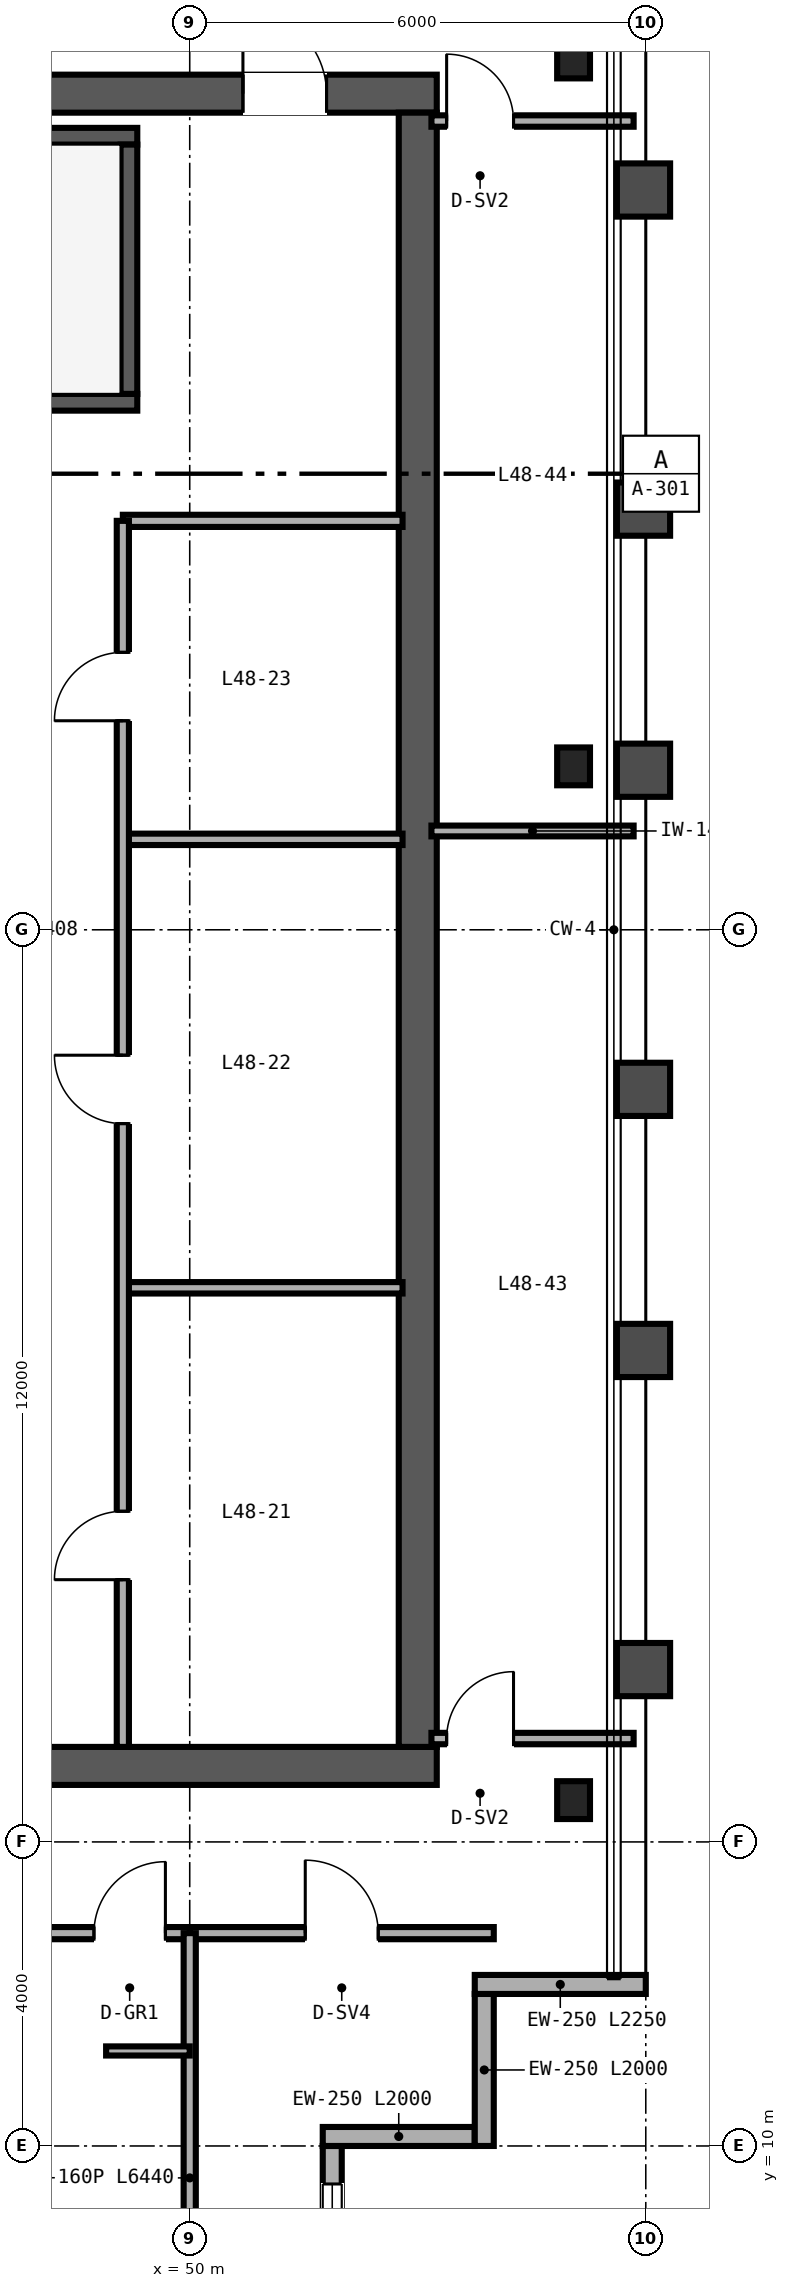
"""IFC4 building model, lengths in metres.
Left out: names, types, materials, properties, quantities, classifications, styles, units other than length and angle.
Written with IfcOpenShell. Run it as: python <this file> out.ifc"""

import sys

from ifc_helpers import new_model, si_unit, direction, frame, frame_2d, origin, origin_2d, place, context, subcontext, project, spatial, rectangle, i_section, extrude, source, transform, mapped, element, fill, save


model = new_model("IFC4")
c1 = context("Model", 3, precision=1e-05, world=origin(), true_north=direction((0.0, 1.0)))
c2 = subcontext(c1, "Body", "Model", "MODEL_VIEW")
j1 = project(units=[si_unit("LENGTHUNIT", "METRE"), si_unit("PLANEANGLEUNIT", "RADIAN")], contexts=[c1])
p1 = place(None, origin())
s1 = spatial("IfcSite", under=j1, at=p1, CompositionType="ELEMENT")
p2 = place(p1, origin())
s2 = spatial("IfcBuilding", under=s1, at=p2, CompositionType="ELEMENT")
p3 = place(p2, frame((0.0, 0.0, 192.0)))
s3 = spatial("IfcBuildingStorey", under=s2, at=p3, CompositionType="ELEMENT", Elevation=192.0)
p4 = place(p3, frame((40.75, 15.0, 0.0), z_axis=(0.0, 0.0, 1.0), x_axis=(1.0, 0.0, 0.0)))
e1 = element("IfcWall", 1, at=p4, inside=s3, PredefinedType="SHEAR", context=c2, shape_type="SweptSolid", body=[
    extrude(rectangle(XDim=12.5, YDim=0.5, at=frame_2d((6.25, 0.0))), origin(), (0.0, 0.0, 1.0), 3.37),
])
p5 = place(p4, frame((4.35, 0.0, 0.0)))
e2 = element("IfcOpeningElement", 2, at=p5, cuts=e1, PredefinedType="OPENING", context=c2, shape_type="SweptSolid", body=[
    extrude(rectangle(XDim=1.0, YDim=2.15, at=frame_2d((0.5, 1.075))), frame((0.0, 0.26, 0.0), z_axis=(0.0, -1.0, 0.0), x_axis=(1.0, 0.0, 0.0)), (0.0, 0.0, 1.0), 0.52),
])
p6 = place(p3, frame((40.75, 37.0, 0.0), z_axis=(0.0, 0.0, 1.0), x_axis=(1.0, 0.0, 0.0)))
e3 = element("IfcWall", 3, at=p6, inside=s3, PredefinedType="SHEAR", context=c2, shape_type="SweptSolid", body=[
    extrude(rectangle(XDim=12.5, YDim=0.5, at=frame_2d((6.25, 0.0))), origin(), (0.0, 0.0, 1.0), 3.37),
])
p7 = place(p6, frame((9.95, 0.0, 0.0)))
e4 = element("IfcOpeningElement", 4, at=p7, cuts=e3, PredefinedType="OPENING", context=c2, shape_type="SweptSolid", body=[
    extrude(rectangle(XDim=1.1, YDim=2.15, at=frame_2d((0.55, 1.075))), frame((0.0, 0.26, 0.0), z_axis=(0.0, -1.0, 0.0), x_axis=(1.0, 0.0, 0.0)), (0.0, 0.0, 1.0), 0.52),
])
p8 = place(p3, frame((53.0, 15.25, 0.0), z_axis=(0.0, 0.0, 1.0), x_axis=(0.0, 1.0, 0.0)))
e5 = element("IfcWall", 5, at=p8, inside=s3, PredefinedType="SHEAR", context=c2, shape_type="SweptSolid", body=[
    extrude(rectangle(XDim=21.5, YDim=0.5, at=frame_2d((10.75, 0.0))), origin(), (0.0, 0.0, 1.0), 3.37),
])
p9 = place(p3, frame((41.25, 32.94, 0.0), z_axis=(0.0, 0.0, 1.0), x_axis=(1.0, 0.0, 0.0)))
e6 = element("IfcWall", 6, at=p9, inside=s3, PredefinedType="SHEAR", context=c2, shape_type="SweptSolid", body=[
    extrude(rectangle(XDim=8.06, YDim=0.22, at=frame_2d((4.03, 0.0))), origin(), (0.0, 0.0, 1.0), 3.4),
])
p10 = place(p9, frame((0.67, 0.0, 0.0)))
e7 = element("IfcOpeningElement", 7, at=p10, cuts=e6, PredefinedType="OPENING", context=c2, shape_type="SweptSolid", body=[
    extrude(rectangle(XDim=1.05, YDim=2.15, at=frame_2d((0.525, 1.075))), frame((0.0, 0.12, 0.0), z_axis=(0.0, -1.0, 0.0), x_axis=(1.0, 0.0, 0.0)), (0.0, 0.0, 1.0), 0.24),
])
p11 = place(p3, frame((41.25, 36.44, 0.0), z_axis=(0.0, 0.0, 1.0), x_axis=(1.0, 0.0, 0.0)))
e8 = element("IfcWall", 8, at=p11, inside=s3, PredefinedType="SHEAR", context=c2, shape_type="SweptSolid", body=[
    extrude(rectangle(XDim=8.06, YDim=0.22, at=frame_2d((4.03, 0.0))), origin(), (0.0, 0.0, 1.0), 3.4),
])
p12 = place(p3, frame((49.2, 33.05, 0.0), z_axis=(0.0, 0.0, 1.0), x_axis=(0.0, 1.0, 0.0)))
e9 = element("IfcWall", 9, at=p12, inside=s3, PredefinedType="SHEAR", context=c2, shape_type="SweptSolid", body=[
    extrude(rectangle(XDim=3.28, YDim=0.22, at=frame_2d((1.64, 0.0))), origin(), (0.0, 0.0, 1.0), 3.4),
])
m1 = source(origin(), c2, "Body", "SweptSolid", [
    extrude(i_section(OverallWidth=0.432, OverallDepth=0.498, WebThickness=0.056, FlangeThickness=0.089, FilletRadius=0.025, at=origin_2d()), origin(), (0.0, 0.0, 1.0), 3.37),
])
for number, where, z_axis, x_axis in (
    (10, (55.05, 14.55, 0.0), (0.0, 0.0, 1.0), (1.0, 0.0, 0.0)),
    (11, (55.05, 28.15, 0.0), (0.0, 0.0, 1.0), (1.0, 0.0, 0.0)),
    (12, (55.05, 37.45, 0.0), (0.0, 0.0, 1.0), (1.0, 0.0, 0.0)),
):
    element("IfcColumn", number, at=place(p3, frame(where, z_axis=z_axis, x_axis=x_axis)), inside=s3, PredefinedType="COLUMN", context=c2, shape_type="MappedRepresentation", body=[
        mapped(m1, transform((0.0, 0.0, 0.0), scale=1.0)),
    ])
p13 = place(p3, frame((51.875, 8.0, 0.0), z_axis=(0.0, 0.0, 1.0), x_axis=(0.0, 1.0, 0.0)))
e13 = element("IfcWall", 13, at=p13, inside=s3, PredefinedType="SOLIDWALL", context=c2, shape_type="SweptSolid", body=[
    extrude(rectangle(XDim=2.0, YDim=0.25, at=frame_2d((1.0, 0.0))), origin(), (0.0, 0.0, 1.0), 3.37),
])
p14 = place(p13, frame((0.5, 0.0, 0.85)))
e14 = element("IfcOpeningElement", 14, at=p14, cuts=e13, PredefinedType="OPENING", context=c2, shape_type="SweptSolid", body=[
    extrude(rectangle(XDim=1.0, YDim=1.9, at=frame_2d((0.5, 0.95))), frame((0.0, 0.135, 0.0), z_axis=(0.0, -1.0, 0.0), x_axis=(1.0, 0.0, 0.0)), (0.0, 0.0, 1.0), 0.27),
])
for number, where, z_axis, x_axis in (
    (15, (51.75, 10.125, 0.0), (0.0, 0.0, 1.0), (1.0, 0.0, 0.0)),
    (16, (53.875, 10.0, 0.0), (0.0, 0.0, 1.0), (0.0, 1.0, 0.0)),
):
    element("IfcWall", number, at=place(p3, frame(where, z_axis=z_axis, x_axis=x_axis)), inside=s3, PredefinedType="SOLIDWALL", context=c2, shape_type="SweptSolid", body=[
        extrude(rectangle(XDim=2.0, YDim=0.25, at=frame_2d((1.0, 0.0))), origin(), (0.0, 0.0, 1.0), 3.37),
    ])
p15 = place(p3, frame((53.75, 12.125, 0.0), z_axis=(0.0, 0.0, 1.0), x_axis=(1.0, 0.0, 0.0)))
e17 = element("IfcWall", 17, at=p15, inside=s3, PredefinedType="SOLIDWALL", context=c2, shape_type="SweptSolid", body=[
    extrude(rectangle(XDim=2.25, YDim=0.25, at=frame_2d((1.125, 0.0))), origin(), (0.0, 0.0, 1.0), 3.37),
])
p16 = place(p3, frame((49.12, 31.38, 0.0), z_axis=(0.0, 0.0, 1.0), x_axis=(1.0, 0.0, 0.0)))
e18 = element("IfcWall", 18, at=p16, inside=s3, PredefinedType="PARTITIONING", context=c2, shape_type="SweptSolid", body=[
    extrude(rectangle(XDim=3.68, YDim=0.16, at=frame_2d((1.84, 0.0))), origin(), (0.0, 0.0, 1.0), 2.47),
])
for number, where, z_axis, x_axis in (
    (19, (49.12, 21.29, 0.0), (0.0, 0.0, 1.0), (1.0, 0.0, 0.0)),
    (20, (49.12, 27.19, 0.0), (0.0, 0.0, 1.0), (1.0, 0.0, 0.0)),
):
    element("IfcWall", number, at=place(p3, frame(where, z_axis=z_axis, x_axis=x_axis)), inside=s3, PredefinedType="PARTITIONING", context=c2, shape_type="SweptSolid", body=[
        extrude(rectangle(XDim=3.68, YDim=0.15, at=frame_2d((1.84, 0.0))), origin(), (0.0, 0.0, 1.0), 3.37),
    ])
p17 = place(p3, frame((49.12, 15.25, 0.0), z_axis=(0.0, 0.0, 1.0), x_axis=(0.0, 1.0, 0.0)))
e21 = element("IfcWall", 21, at=p17, inside=s3, PredefinedType="PARTITIONING", context=c2, shape_type="SweptSolid", body=[
    extrude(rectangle(XDim=16.13, YDim=0.16, at=frame_2d((8.065, 0.0))), origin(), (0.0, 0.0, 1.0), 2.443),
])
p18 = place(p17, frame((2.2, 0.0, 0.0)))
e22 = element("IfcOpeningElement", 22, at=p18, cuts=e21, PredefinedType="OPENING", context=c2, shape_type="SweptSolid", body=[
    extrude(rectangle(XDim=0.9, YDim=2.15, at=frame_2d((0.45, 1.075))), frame((0.0, 0.09, 0.0), z_axis=(0.0, -1.0, 0.0), x_axis=(1.0, 0.0, 0.0)), (0.0, 0.0, 1.0), 0.18),
])
p19 = place(p17, frame((8.2, 0.0, 0.0)))
e23 = element("IfcOpeningElement", 23, at=p19, cuts=e21, PredefinedType="OPENING", context=c2, shape_type="SweptSolid", body=[
    extrude(rectangle(XDim=0.9, YDim=2.15, at=frame_2d((0.45, 1.075))), frame((0.0, 0.09, 0.0), z_axis=(0.0, -1.0, 0.0), x_axis=(1.0, 0.0, 0.0)), (0.0, 0.0, 1.0), 0.18),
])
p20 = place(p17, frame((13.5, 0.0, 0.0)))
e24 = element("IfcOpeningElement", 24, at=p20, cuts=e21, PredefinedType="OPENING", context=c2, shape_type="SweptSolid", body=[
    extrude(rectangle(XDim=0.9, YDim=2.15, at=frame_2d((0.45, 1.075))), frame((0.0, 0.09, 0.0), z_axis=(0.0, -1.0, 0.0), x_axis=(1.0, 0.0, 0.0)), (0.0, 0.0, 1.0), 0.18),
])
p21 = place(p3, frame((53.18, 15.36, 0.0), z_axis=(0.0, 0.0, 1.0), x_axis=(1.0, 0.0, 0.0)))
e25 = element("IfcWall", 25, at=p21, inside=s3, PredefinedType="PARTITIONING", context=c2, shape_type="SweptSolid", body=[
    extrude(rectangle(XDim=2.66, YDim=0.15, at=frame_2d((1.33, 0.0))), origin(), (0.0, 0.0, 1.0), 2.591),
])
p22 = place(p21, frame((0.2, 0.0, 0.0)))
e26 = element("IfcOpeningElement", 26, at=p22, cuts=e25, PredefinedType="OPENING", context=c2, shape_type="SweptSolid", body=[
    extrude(rectangle(XDim=0.88, YDim=2.15, at=frame_2d((0.44, 1.075))), frame((0.0, 0.085, 0.0), z_axis=(0.0, -1.0, 0.0), x_axis=(1.0, 0.0, 0.0)), (0.0, 0.0, 1.0), 0.17),
])
p23 = place(p3, frame((53.18, 36.64, 0.0), z_axis=(0.0, 0.0, 1.0), x_axis=(1.0, 0.0, 0.0)))
e27 = element("IfcWall", 27, at=p23, inside=s3, PredefinedType="PARTITIONING", context=c2, shape_type="SweptSolid", body=[
    extrude(rectangle(XDim=2.66, YDim=0.15, at=frame_2d((1.33, 0.0))), origin(), (0.0, 0.0, 1.0), 2.753),
])
p24 = place(p23, frame((0.2, 0.0, 0.0)))
e28 = element("IfcOpeningElement", 28, at=p24, cuts=e27, PredefinedType="OPENING", context=c2, shape_type="SweptSolid", body=[
    extrude(rectangle(XDim=0.88, YDim=2.15, at=frame_2d((0.44, 1.075))), frame((0.0, 0.085, 0.0), z_axis=(0.0, -1.0, 0.0), x_axis=(1.0, 0.0, 0.0)), (0.0, 0.0, 1.0), 0.17),
])
p25 = place(p3, frame((53.18, 27.3, 0.0), z_axis=(0.0, 0.0, 1.0), x_axis=(1.0, 0.0, 0.0)))
e29 = element("IfcWall", 29, at=p25, inside=s3, PredefinedType="PARTITIONING", context=c2, shape_type="SweptSolid", body=[
    extrude(rectangle(XDim=2.66, YDim=0.142, at=frame_2d((1.33, 0.0))), origin(), (0.0, 0.0, 1.0), 2.591),
])
p26 = place(p3, frame((50.0, 12.8, 0.0), z_axis=(0.0, 0.0, 1.0), x_axis=(1.0, 0.0, 0.0)))
e30 = element("IfcWall", 30, at=p26, inside=s3, PredefinedType="PARTITIONING", context=c2, shape_type="SweptSolid", body=[
    extrude(rectangle(XDim=4.0, YDim=0.16, at=frame_2d((2.0, 0.0))), origin(), (0.0, 0.0, 1.0), 3.37),
])
p27 = place(p26, frame((1.52, 0.0, 0.0)))
e31 = element("IfcOpeningElement", 31, at=p27, cuts=e30, PredefinedType="OPENING", context=c2, shape_type="SweptSolid", body=[
    extrude(rectangle(XDim=0.96, YDim=2.15, at=frame_2d((0.48, 1.075))), frame((0.0, 0.09, 0.0), z_axis=(0.0, -1.0, 0.0), x_axis=(1.0, 0.0, 0.0)), (0.0, 0.0, 1.0), 0.18),
])
p28 = place(p3, frame((38.0, 12.8, 0.0), z_axis=(0.0, 0.0, 1.0), x_axis=(1.0, 0.0, 0.0)))
e32 = element("IfcWall", 32, at=p28, inside=s3, PredefinedType="PARTITIONING", context=c2, shape_type="SweptSolid", body=[
    extrude(rectangle(XDim=12.0, YDim=0.16, at=frame_2d((6.0, 0.0))), origin(), (0.0, 0.0, 1.0), 2.913),
])
p29 = place(p28, frame((2.42, 0.0, 0.0)))
e33 = element("IfcOpeningElement", 33, at=p29, cuts=e32, PredefinedType="OPENING", context=c2, shape_type="SweptSolid", body=[
    extrude(rectangle(XDim=0.96, YDim=2.15, at=frame_2d((0.48, 1.075))), frame((0.0, 0.09, 0.0), z_axis=(0.0, -1.0, 0.0), x_axis=(1.0, 0.0, 0.0)), (0.0, 0.0, 1.0), 0.18),
])
p30 = place(p28, frame((10.74, 0.0, 0.0)))
e34 = element("IfcOpeningElement", 34, at=p30, cuts=e32, PredefinedType="OPENING", context=c2, shape_type="SweptSolid", body=[
    extrude(rectangle(XDim=0.94, YDim=2.15, at=frame_2d((0.47, 1.075))), frame((0.0, 0.09, 0.0), z_axis=(0.0, -1.0, 0.0), x_axis=(1.0, 0.0, 0.0)), (0.0, 0.0, 1.0), 0.18),
])
p31 = place(p3, frame((50.0, 6.36, 0.0), z_axis=(0.0, 0.0, 1.0), x_axis=(0.0, 1.0, 0.0)))
e35 = element("IfcWall", 35, at=p31, inside=s3, PredefinedType="PARTITIONING", context=c2, shape_type="SweptSolid", body=[
    extrude(rectangle(XDim=6.44, YDim=0.16, at=frame_2d((3.22, 0.0))), origin(), (0.0, 0.0, 1.0), 2.677),
])
p32 = place(p3, frame((48.9, 11.25, 0.0), z_axis=(0.0, 0.0, 1.0), x_axis=(1.0, 0.0, 0.0)))
e36 = element("IfcWall", 36, at=p32, inside=s3, PredefinedType="PARTITIONING", context=c2, shape_type="SweptSolid", body=[
    extrude(rectangle(XDim=1.1, YDim=0.12, at=frame_2d((0.55, 0.0))), origin(), (0.0, 0.0, 1.0), 3.37),
])
m2 = source(origin(), c2, "Body", "SweptSolid", [
    extrude(rectangle(XDim=1.0, YDim=1.9, at=frame_2d((0.5, 0.95))), frame((0.0, 0.03, 0.0), z_axis=(0.0, -1.0, 0.0), x_axis=(1.0, 0.0, 0.0)), (0.0, 0.0, 1.0), 0.06),
])
p33 = place(p14, origin())
e37 = element("IfcWindow", 37, at=p33, inside=s3, PartitioningType="SINGLE_PANEL", PredefinedType="WINDOW", context=c2, shape_type="MappedRepresentation", body=[
    mapped(m2, transform((0.0, 0.0, 0.0), scale=1.0)),
])
fill(e14, e37)
m3 = source(origin(), c2, "Body", "SweptSolid", [
    extrude(rectangle(XDim=1.1, YDim=2.15, at=frame_2d((0.55, 1.075))), frame((0.0, 0.025, 0.0), z_axis=(0.0, -1.0, 0.0), x_axis=(1.0, 0.0, 0.0)), (0.0, 0.0, 1.0), 0.05),
])
p34 = place(p7, origin())
e38 = element("IfcDoor", 38, at=p34, inside=s3, OperationType="SINGLE_SWING_LEFT", PredefinedType="DOOR", context=c2, shape_type="MappedRepresentation", body=[
    mapped(m3, transform((0.0, 0.0, 0.0), scale=1.0)),
])
fill(e4, e38)
m4 = source(origin(), c2, "Body", "SweptSolid", [
    extrude(rectangle(XDim=0.9, YDim=2.15, at=frame_2d((0.45, 1.075))), frame((0.0, 0.025, 0.0), z_axis=(0.0, -1.0, 0.0), x_axis=(1.0, 0.0, 0.0)), (0.0, 0.0, 1.0), 0.05),
])
p35 = place(p18, origin())
e39 = element("IfcDoor", 39, at=p35, inside=s3, OperationType="SINGLE_SWING_LEFT", PredefinedType="DOOR", context=c2, shape_type="MappedRepresentation", body=[
    mapped(m4, transform((0.0, 0.0, 0.0), scale=1.0)),
])
fill(e22, e39)
p36 = place(p19, origin())
e40 = element("IfcDoor", 40, at=p36, inside=s3, OperationType="SINGLE_SWING_RIGHT", PredefinedType="DOOR", context=c2, shape_type="MappedRepresentation", body=[
    mapped(m4, transform((0.0, 0.0, 0.0), scale=1.0)),
])
fill(e23, e40)
p37 = place(p20, origin())
e41 = element("IfcDoor", 41, at=p37, inside=s3, OperationType="SINGLE_SWING_LEFT", PredefinedType="DOOR", context=c2, shape_type="MappedRepresentation", body=[
    mapped(m4, transform((0.0, 0.0, 0.0), scale=1.0)),
])
fill(e24, e41)
m5 = source(origin(), c2, "Body", "SweptSolid", [
    extrude(rectangle(XDim=0.88, YDim=2.15, at=frame_2d((0.44, 1.075))), frame((0.0, 0.025, 0.0), z_axis=(0.0, -1.0, 0.0), x_axis=(1.0, 0.0, 0.0)), (0.0, 0.0, 1.0), 0.05),
])
p38 = place(p22, origin())
e42 = element("IfcDoor", 42, at=p38, inside=s3, OperationType="SINGLE_SWING_RIGHT", PredefinedType="DOOR", context=c2, shape_type="MappedRepresentation", body=[
    mapped(m5, transform((0.0, 0.0, 0.0), scale=1.0)),
])
fill(e26, e42)
p39 = place(p24, origin())
e43 = element("IfcDoor", 43, at=p39, inside=s3, OperationType="SINGLE_SWING_LEFT", PredefinedType="DOOR", context=c2, shape_type="MappedRepresentation", body=[
    mapped(m5, transform((0.0, 0.0, 0.0), scale=1.0)),
])
fill(e28, e43)
m6 = source(origin(), c2, "Body", "SweptSolid", [
    extrude(rectangle(XDim=0.96, YDim=2.15, at=frame_2d((0.48, 1.075))), frame((0.0, 0.025, 0.0), z_axis=(0.0, -1.0, 0.0), x_axis=(1.0, 0.0, 0.0)), (0.0, 0.0, 1.0), 0.05),
])
p40 = place(p27, origin())
e44 = element("IfcDoor", 44, at=p40, inside=s3, OperationType="SINGLE_SWING_LEFT", PredefinedType="DOOR", context=c2, shape_type="MappedRepresentation", body=[
    mapped(m6, transform((0.0, 0.0, 0.0), scale=1.0)),
])
fill(e31, e44)
m7 = source(origin(), c2, "Body", "SweptSolid", [
    extrude(rectangle(XDim=0.94, YDim=2.15, at=frame_2d((0.47, 1.075))), frame((0.0, 0.025, 0.0), z_axis=(0.0, -1.0, 0.0), x_axis=(1.0, 0.0, 0.0)), (0.0, 0.0, 1.0), 0.05),
])
p41 = place(p30, origin())
e45 = element("IfcDoor", 45, at=p41, inside=s3, OperationType="SINGLE_SWING_RIGHT", PredefinedType="DOOR", context=c2, shape_type="MappedRepresentation", body=[
    mapped(m7, transform((0.0, 0.0, 0.0), scale=1.0)),
])
fill(e34, e45)
save(model, sys.argv[1])
